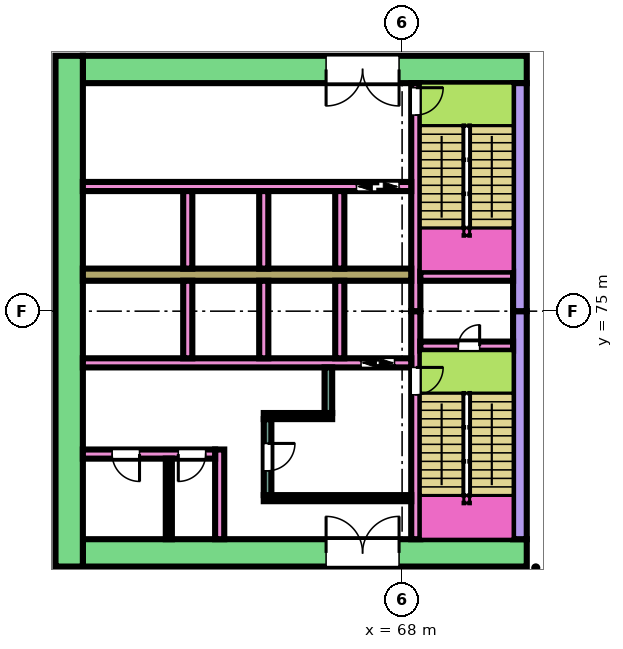
"""IFC4 building model, lengths in metres.
Left out: names, types, materials, properties, quantities, classifications, styles, units other than length and angle.
Written with IfcOpenShell. Run it as: python <this file> out.ifc"""

import sys

from ifc_helpers import new_model, si_unit, direction, frame, frame_2d, origin, place, context, subcontext, project, spatial, rectangle, extrude, element, fill, save


model = new_model("IFC4")
c1 = context("Model", 3, precision=1e-05, world=origin(), true_north=direction((0.0, 1.0)))
c2 = subcontext(c1, "Body", "Model", "MODEL_VIEW")
j1 = project(units=[si_unit("LENGTHUNIT", "METRE"), si_unit("PLANEANGLEUNIT", "RADIAN")], contexts=[c1])
p1 = place(None, origin())
s1 = spatial("IfcSite", under=j1, at=p1, CompositionType="ELEMENT")
p2 = place(p1, origin())
s2 = spatial("IfcBuilding", under=s1, at=p2, CompositionType="ELEMENT")
p3 = place(p2, frame((0.0, 0.0, -4.5)))
s3 = spatial("IfcBuildingStorey", under=s2, at=p3, CompositionType="ELEMENT", Elevation=-4.5)
p4 = place(p3, frame((72.1, 67.05, 0.0), z_axis=(0.0, 0.0, 1.0), x_axis=(-1.0, 0.0, 0.0)))
e1 = element("IfcWall", 1, at=p4, inside=s3, PredefinedType="SHEAR", context=c2, shape_type="SweptSolid", body=[
    extrude(rectangle(XDim=14.6, YDim=0.9, at=frame_2d((7.3, 0.0))), origin(), (0.0, 0.0, 1.0), 4.05),
])
p5 = place(p4, frame((4.2, 0.0, 0.0)))
e2 = element("IfcOpeningElement", 2, at=p5, cuts=e1, PredefinedType="OPENING", context=c2, shape_type="SweptSolid", body=[
    extrude(rectangle(XDim=2.4, YDim=2.4, at=frame_2d((1.2, 1.2))), frame((0.0, 0.46, 0.0), z_axis=(0.0, -1.0, 0.0), x_axis=(1.0, 0.0, 0.0)), (0.0, 0.0, 1.0), 0.92),
])
p6 = place(p3, frame((72.1, 82.95, 0.0), z_axis=(0.0, 0.0, 1.0), x_axis=(-1.0, 0.0, 0.0)))
e3 = element("IfcWall", 3, at=p6, inside=s3, PredefinedType="SHEAR", context=c2, shape_type="SweptSolid", body=[
    extrude(rectangle(XDim=14.6, YDim=0.9, at=frame_2d((7.3, 0.0))), origin(), (0.0, 0.0, 1.0), 4.05),
])
p7 = place(p6, frame((4.2, 0.0, 0.0)))
e4 = element("IfcOpeningElement", 4, at=p7, cuts=e3, PredefinedType="OPENING", context=c2, shape_type="SweptSolid", body=[
    extrude(rectangle(XDim=2.4, YDim=2.4, at=frame_2d((1.2, 1.2))), frame((0.0, 0.46, 0.0), z_axis=(0.0, -1.0, 0.0), x_axis=(1.0, 0.0, 0.0)), (0.0, 0.0, 1.0), 0.92),
])
for number, where, z_axis, x_axis in (
    (5, (71.875, 75.0, 0.0), (0.0, 0.0, 1.0), (0.0, -1.0, 0.0)),
    (6, (71.875, 82.5, 0.0), (0.0, 0.0, 1.0), (0.0, -1.0, 0.0)),
):
    element("IfcWall", number, at=place(p3, frame(where, z_axis=z_axis, x_axis=x_axis)), inside=s3, PredefinedType="SHEAR", context=c2, shape_type="SweptSolid", body=[
        extrude(rectangle(XDim=7.5, YDim=0.45, at=frame_2d((3.75, 0.0))), origin(), (0.0, 0.0, 1.0), 4.05),
    ])
p8 = place(p3, frame((57.05, 83.4, 0.0), z_axis=(0.0, 0.0, 1.0), x_axis=(0.0, -1.0, 0.0)))
e7 = element("IfcWall", 7, at=p8, inside=s3, PredefinedType="SHEAR", context=c2, shape_type="SweptSolid", body=[
    extrude(rectangle(XDim=16.8, YDim=0.9, at=frame_2d((8.4, 0.0))), origin(), (0.0, 0.0, 1.0), 4.05),
])
p9 = place(p3, frame((68.45, 75.0, 0.0), z_axis=(0.0, 0.0, 1.0), x_axis=(0.0, -1.0, 0.0)))
e8 = element("IfcWall", 8, at=p9, inside=s3, PredefinedType="SHEAR", context=c2, shape_type="SweptSolid", body=[
    extrude(rectangle(XDim=7.5, YDim=0.3, at=frame_2d((3.75, 0.0))), origin(), (0.0, 0.0, 1.0), 4.05),
])
p10 = place(p9, frame((1.85, 0.0, 0.0)))
e9 = element("IfcOpeningElement", 9, at=p10, cuts=e8, PredefinedType="OPENING", context=c2, shape_type="SweptSolid", body=[
    extrude(rectangle(XDim=0.9, YDim=2.1, at=frame_2d((0.45, 1.05))), frame((0.0, 0.16, 0.0), z_axis=(0.0, -1.0, 0.0), x_axis=(1.0, 0.0, 0.0)), (0.0, 0.0, 1.0), 0.32),
])
p11 = place(p3, frame((68.45, 82.5, 0.0), z_axis=(0.0, 0.0, 1.0), x_axis=(0.0, -1.0, 0.0)))
e10 = element("IfcWall", 10, at=p11, inside=s3, PredefinedType="SHEAR", context=c2, shape_type="SweptSolid", body=[
    extrude(rectangle(XDim=7.5, YDim=0.3, at=frame_2d((3.75, 0.0))), origin(), (0.0, 0.0, 1.0), 4.05),
])
p12 = place(p11, frame((0.15, 0.0, 0.0)))
e11 = element("IfcOpeningElement", 11, at=p12, cuts=e10, PredefinedType="OPENING", context=c2, shape_type="SweptSolid", body=[
    extrude(rectangle(XDim=0.9, YDim=2.1, at=frame_2d((0.45, 1.05))), frame((0.0, 0.16, 0.0), z_axis=(0.0, -1.0, 0.0), x_axis=(1.0, 0.0, 0.0)), (0.0, 0.0, 1.0), 0.32),
])
p13 = place(p3, frame((71.65, 73.85, 0.0), z_axis=(0.0, 0.0, 1.0), x_axis=(-1.0, 0.0, 0.0)))
e12 = element("IfcWall", 12, at=p13, inside=s3, PredefinedType="SHEAR", context=c2, shape_type="SweptSolid", body=[
    extrude(rectangle(XDim=3.05, YDim=0.3, at=frame_2d((1.525, 0.0))), origin(), (0.0, 0.0, 1.0), 4.05),
])
p14 = place(p13, frame((1.1, 0.0, 0.0)))
e13 = element("IfcOpeningElement", 13, at=p14, cuts=e12, PredefinedType="OPENING", context=c2, shape_type="SweptSolid", body=[
    extrude(rectangle(XDim=0.7, YDim=2.0, at=frame_2d((0.35, 1.0))), frame((0.0, 0.16, 0.0), z_axis=(0.0, -1.0, 0.0), x_axis=(1.0, 0.0, 0.0)), (0.0, 0.0, 1.0), 0.32),
])
p15 = place(p3, frame((71.65, 76.15, 0.0), z_axis=(0.0, 0.0, 1.0), x_axis=(-1.0, 0.0, 0.0)))
e14 = element("IfcWall", 14, at=p15, inside=s3, PredefinedType="SHEAR", context=c2, shape_type="SweptSolid", body=[
    extrude(rectangle(XDim=3.05, YDim=0.3, at=frame_2d((1.525, 0.0))), origin(), (0.0, 0.0, 1.0), 4.05),
])
p16 = place(p3, frame((68.3, 73.3, 0.0), z_axis=(0.0, 0.0, 1.0), x_axis=(-1.0, 0.0, 0.0)))
e15 = element("IfcWall", 15, at=p16, inside=s3, PredefinedType="SHEAR", context=c2, shape_type="SweptSolid", body=[
    extrude(rectangle(XDim=10.8, YDim=0.3, at=frame_2d((5.4, 0.0))), origin(), (0.0, 0.0, 1.0), 4.05),
])
p17 = place(p16, frame((0.55, 0.0, 0.0)))
e16 = element("IfcOpeningElement", 16, at=p17, cuts=e15, PredefinedType="OPENING", context=c2, shape_type="SweptSolid", body=[
    extrude(rectangle(XDim=1.1, YDim=2.1, at=frame_2d((0.55, 1.05))), frame((0.0, 0.16, 0.0), z_axis=(0.0, -1.0, 0.0), x_axis=(1.0, 0.0, 0.0)), (0.0, 0.0, 1.0), 0.32),
])
p18 = place(p3, frame((68.3, 76.2, 0.0), z_axis=(0.0, 0.0, 1.0), x_axis=(-1.0, 0.0, 0.0)))
e17 = element("IfcWall", 17, at=p18, inside=s3, PredefinedType="SHEAR", context=c2, shape_type="SweptSolid", body=[
    extrude(rectangle(XDim=10.8, YDim=0.4, at=frame_2d((5.4, 0.0))), origin(), (0.0, 0.0, 1.0), 4.05),
])
p19 = place(p3, frame((68.3, 79.1, 0.0), z_axis=(0.0, 0.0, 1.0), x_axis=(-1.0, 0.0, 0.0)))
e18 = element("IfcWall", 18, at=p19, inside=s3, PredefinedType="SHEAR", context=c2, shape_type="SweptSolid", body=[
    extrude(rectangle(XDim=10.8, YDim=0.3, at=frame_2d((5.4, 0.0))), origin(), (0.0, 0.0, 1.0), 4.05),
])
p20 = place(p19, frame((0.4, 0.0, 0.0)))
e19 = element("IfcOpeningElement", 19, at=p20, cuts=e18, PredefinedType="OPENING", context=c2, shape_type="SweptSolid", body=[
    extrude(rectangle(XDim=1.4, YDim=2.1, at=frame_2d((0.7, 1.05))), frame((0.0, 0.16, 0.0), z_axis=(0.0, -1.0, 0.0), x_axis=(1.0, 0.0, 0.0)), (0.0, 0.0, 1.0), 0.32),
])
for number, where, z_axis, x_axis in (
    (20, (65.95, 76.0, 0.0), (0.0, 0.0, 1.0), (0.0, -1.0, 0.0)),
    (21, (63.45, 76.0, 0.0), (0.0, 0.0, 1.0), (0.0, -1.0, 0.0)),
    (22, (60.95, 76.0, 0.0), (0.0, 0.0, 1.0), (0.0, -1.0, 0.0)),
    (23, (65.95, 78.95, 0.0), (0.0, 0.0, 1.0), (0.0, -1.0, 0.0)),
    (24, (63.45, 78.95, 0.0), (0.0, 0.0, 1.0), (0.0, -1.0, 0.0)),
    (25, (60.95, 78.95, 0.0), (0.0, 0.0, 1.0), (0.0, -1.0, 0.0)),
):
    element("IfcWall", number, at=place(p3, frame(where, z_axis=z_axis, x_axis=x_axis)), inside=s3, PredefinedType="SHEAR", context=c2, shape_type="SweptSolid", body=[
        extrude(rectangle(XDim=2.55, YDim=0.3, at=frame_2d((1.275, 0.0))), origin(), (0.0, 0.0, 1.0), 4.05),
    ])
p21 = place(p3, frame((68.3, 68.85, 0.0), z_axis=(0.0, 0.0, 1.0), x_axis=(-1.0, 0.0, 0.0)))
e26 = element("IfcWall", 26, at=p21, inside=s3, PredefinedType="SHEAR", context=c2, shape_type="SweptSolid", body=[
    extrude(rectangle(XDim=4.85, YDim=0.2, at=frame_2d((2.425, 0.0))), origin(), (0.0, 0.0, 1.0), 4.05),
])
p22 = place(p3, frame((63.575, 71.45, 0.0), z_axis=(0.0, 0.0, 1.0), x_axis=(0.0, -1.0, 0.0)))
e27 = element("IfcWall", 27, at=p22, inside=s3, PredefinedType="SHEAR", context=c2, shape_type="SweptSolid", body=[
    extrude(rectangle(XDim=2.5, YDim=0.25, at=frame_2d((1.25, 0.0))), origin(), (0.0, 0.0, 1.0), 4.05),
])
p23 = place(p22, frame((0.8, 0.0, 0.0)))
e28 = element("IfcOpeningElement", 28, at=p23, cuts=e27, PredefinedType="OPENING", context=c2, shape_type="SweptSolid", body=[
    extrude(rectangle(XDim=0.9, YDim=2.1, at=frame_2d((0.45, 1.05))), frame((0.0, 0.135, 0.0), z_axis=(0.0, -1.0, 0.0), x_axis=(1.0, 0.0, 0.0)), (0.0, 0.0, 1.0), 0.27),
])
p24 = place(p3, frame((65.7, 71.55, 0.0), z_axis=(0.0, 0.0, 1.0), x_axis=(-1.0, 0.0, 0.0)))
e29 = element("IfcWall", 29, at=p24, inside=s3, PredefinedType="SHEAR", context=c2, shape_type="SweptSolid", body=[
    extrude(rectangle(XDim=2.25, YDim=0.2, at=frame_2d((1.125, 0.0))), origin(), (0.0, 0.0, 1.0), 4.05),
])
p25 = place(p3, frame((65.575, 73.15, 0.0), z_axis=(0.0, 0.0, 1.0), x_axis=(0.0, -1.0, 0.0)))
e30 = element("IfcWall", 30, at=p25, inside=s3, PredefinedType="SHEAR", context=c2, shape_type="SweptSolid", body=[
    extrude(rectangle(XDim=1.5, YDim=0.25, at=frame_2d((0.75, 0.0))), origin(), (0.0, 0.0, 1.0), 4.05),
])
p26 = place(p3, frame((62.0, 70.45, 0.0), z_axis=(0.0, 0.0, 1.0), x_axis=(0.0, -1.0, 0.0)))
e31 = element("IfcWall", 31, at=p26, inside=s3, PredefinedType="SHEAR", context=c2, shape_type="SweptSolid", body=[
    extrude(rectangle(XDim=2.95, YDim=0.3, at=frame_2d((1.475, 0.0))), origin(), (0.0, 0.0, 1.0), 4.05),
])
p27 = place(p3, frame((61.85, 70.3, 0.0), z_axis=(0.0, 0.0, 1.0), x_axis=(-1.0, 0.0, 0.0)))
e32 = element("IfcWall", 32, at=p27, inside=s3, PredefinedType="SHEAR", context=c2, shape_type="SweptSolid", body=[
    extrude(rectangle(XDim=4.35, YDim=0.3, at=frame_2d((2.175, 0.0))), origin(), (0.0, 0.0, 1.0), 4.05),
])
p28 = place(p27, frame((0.311, 0.0, 0.0)))
e33 = element("IfcOpeningElement", 33, at=p28, cuts=e32, PredefinedType="OPENING", context=c2, shape_type="SweptSolid", body=[
    extrude(rectangle(XDim=0.9, YDim=2.1, at=frame_2d((0.45, 1.05))), frame((0.0, 0.16, 0.0), z_axis=(0.0, -1.0, 0.0), x_axis=(1.0, 0.0, 0.0)), (0.0, 0.0, 1.0), 0.32),
])
p29 = place(p27, frame((2.486, 0.0, 0.0)))
e34 = element("IfcOpeningElement", 34, at=p29, cuts=e32, PredefinedType="OPENING", context=c2, shape_type="SweptSolid", body=[
    extrude(rectangle(XDim=0.9, YDim=2.1, at=frame_2d((0.45, 1.05))), frame((0.0, 0.16, 0.0), z_axis=(0.0, -1.0, 0.0), x_axis=(1.0, 0.0, 0.0)), (0.0, 0.0, 1.0), 0.32),
])
p30 = place(p3, frame((60.327, 70.15, 0.0), z_axis=(0.0, 0.0, 1.0), x_axis=(0.0, -1.0, 0.0)))
e35 = element("IfcWall", 35, at=p30, inside=s3, PredefinedType="PARTITIONING", context=c2, shape_type="SweptSolid", body=[
    extrude(rectangle(XDim=2.65, YDim=0.2, at=frame_2d((1.325, 0.0))), origin(), (0.0, 0.0, 1.0), 4.05),
])
p31 = place(p14, frame((0.7, 0.0, 0.0), z_axis=(0.0, 0.0, 1.0), x_axis=(-1.0, 0.0, 0.0)))
e36 = element("IfcDoor", 36, at=p31, inside=s3, OperationType="SINGLE_SWING_RIGHT", PredefinedType="DOOR", context=c2, shape_type="SweptSolid", body=[
    extrude(rectangle(XDim=0.7, YDim=2.0, at=frame_2d((0.35, 1.0))), frame((0.0, 0.025, 0.0), z_axis=(0.0, -1.0, 0.0), x_axis=(1.0, 0.0, 0.0)), (0.0, 0.0, 1.0), 0.05),
])
fill(e13, e36)
p32 = place(p10, origin())
e37 = element("IfcDoor", 37, at=p32, inside=s3, OperationType="SINGLE_SWING_LEFT", PredefinedType="DOOR", context=c2, shape_type="SweptSolid", body=[
    extrude(rectangle(XDim=0.9, YDim=2.1, at=frame_2d((0.45, 1.05))), frame((0.0, 0.025, 0.0), z_axis=(0.0, -1.0, 0.0), x_axis=(1.0, 0.0, 0.0)), (0.0, 0.0, 1.0), 0.05),
])
fill(e9, e37)
p33 = place(p12, origin())
e38 = element("IfcDoor", 38, at=p33, inside=s3, OperationType="SINGLE_SWING_LEFT", PredefinedType="DOOR", context=c2, shape_type="SweptSolid", body=[
    extrude(rectangle(XDim=0.9, YDim=2.1, at=frame_2d((0.45, 1.05))), frame((0.0, 0.025, 0.0), z_axis=(0.0, -1.0, 0.0), x_axis=(1.0, 0.0, 0.0)), (0.0, 0.0, 1.0), 0.05),
])
fill(e11, e38)
p34 = place(p17, origin())
e39 = element("IfcDoor", 39, at=p34, inside=s3, OperationType="DOUBLE_DOOR_SLIDING", PredefinedType="DOOR", context=c2, shape_type="SweptSolid", body=[
    extrude(rectangle(XDim=1.1, YDim=2.1, at=frame_2d((0.55, 1.05))), frame((0.0, 0.025, 0.0), z_axis=(0.0, -1.0, 0.0), x_axis=(1.0, 0.0, 0.0)), (0.0, 0.0, 1.0), 0.05),
])
fill(e16, e39)
p35 = place(p20, origin())
e40 = element("IfcDoor", 40, at=p35, inside=s3, OperationType="DOUBLE_DOOR_SLIDING", PredefinedType="DOOR", context=c2, shape_type="SweptSolid", body=[
    extrude(rectangle(XDim=1.4, YDim=2.1, at=frame_2d((0.7, 1.05))), frame((0.0, 0.025, 0.0), z_axis=(0.0, -1.0, 0.0), x_axis=(1.0, 0.0, 0.0)), (0.0, 0.0, 1.0), 0.05),
])
fill(e19, e40)
p36 = place(p23, origin())
e41 = element("IfcDoor", 41, at=p36, inside=s3, OperationType="SINGLE_SWING_LEFT", PredefinedType="DOOR", context=c2, shape_type="SweptSolid", body=[
    extrude(rectangle(XDim=0.9, YDim=2.1, at=frame_2d((0.45, 1.05))), frame((0.0, 0.025, 0.0), z_axis=(0.0, -1.0, 0.0), x_axis=(1.0, 0.0, 0.0)), (0.0, 0.0, 1.0), 0.05),
])
fill(e28, e41)
p37 = place(p28, origin())
e42 = element("IfcDoor", 42, at=p37, inside=s3, OperationType="SINGLE_SWING_RIGHT", PredefinedType="DOOR", context=c2, shape_type="SweptSolid", body=[
    extrude(rectangle(XDim=0.9, YDim=2.1, at=frame_2d((0.45, 1.05))), frame((0.0, 0.025, 0.0), z_axis=(0.0, -1.0, 0.0), x_axis=(1.0, 0.0, 0.0)), (0.0, 0.0, 1.0), 0.05),
])
fill(e33, e42)
p38 = place(p29, origin())
e43 = element("IfcDoor", 43, at=p38, inside=s3, OperationType="SINGLE_SWING_LEFT", PredefinedType="DOOR", context=c2, shape_type="SweptSolid", body=[
    extrude(rectangle(XDim=0.9, YDim=2.1, at=frame_2d((0.45, 1.05))), frame((0.0, 0.025, 0.0), z_axis=(0.0, -1.0, 0.0), x_axis=(1.0, 0.0, 0.0)), (0.0, 0.0, 1.0), 0.05),
])
fill(e34, e43)
p39 = place(p5, frame((2.4, 0.0, 0.0), z_axis=(0.0, 0.0, 1.0), x_axis=(-1.0, 0.0, 0.0)))
e44 = element("IfcDoor", 44, at=p39, inside=s3, OperationType="DOUBLE_DOOR_SINGLE_SWING", PredefinedType="DOOR", context=c2, shape_type="SweptSolid", body=[
    extrude(rectangle(XDim=2.4, YDim=2.4, at=frame_2d((1.2, 1.2))), frame((0.0, 0.025, 0.0), z_axis=(0.0, -1.0, 0.0), x_axis=(1.0, 0.0, 0.0)), (0.0, 0.0, 1.0), 0.05),
])
fill(e2, e44)
p40 = place(p7, origin())
e45 = element("IfcDoor", 45, at=p40, inside=s3, OperationType="DOUBLE_DOOR_SINGLE_SWING", PredefinedType="DOOR", context=c2, shape_type="SweptSolid", body=[
    extrude(rectangle(XDim=2.4, YDim=2.4, at=frame_2d((1.2, 1.2))), frame((0.0, 0.025, 0.0), z_axis=(0.0, -1.0, 0.0), x_axis=(1.0, 0.0, 0.0)), (0.0, 0.0, 1.0), 0.05),
])
fill(e4, e45)
save(model, sys.argv[1])
